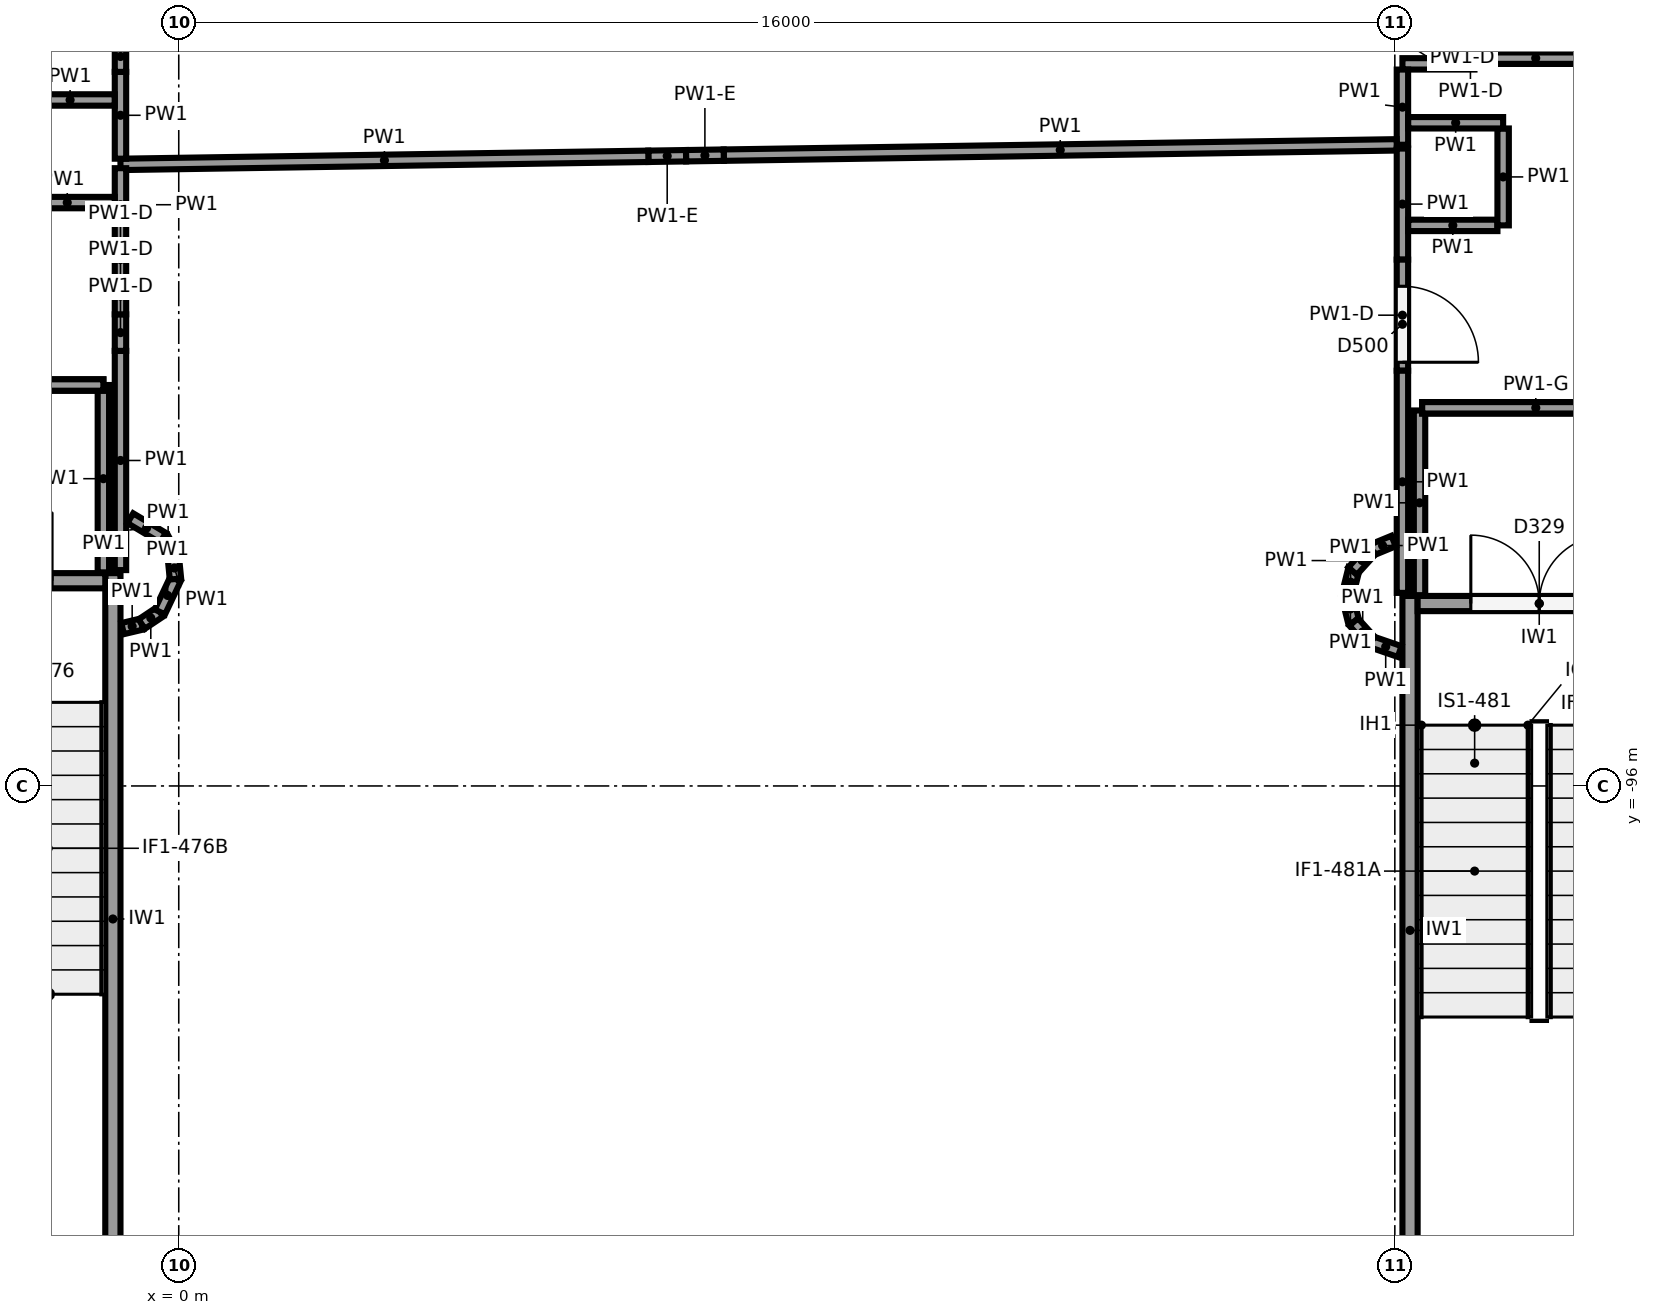
"""IFC4 building model, lengths in metres.
Left out: names, types, materials, properties, quantities, classifications, styles, units other than length and angle.
Written with IfcOpenShell. Run it as: python <this file> out.ifc"""

import sys

from ifc_helpers import new_model, si_unit, direction, frame, frame_2d, origin, origin_2d, place, context, subcontext, project, spatial, rectangle, circle, extrude, element, fill, save


model = new_model("IFC4")
c1 = context("Model", 3, precision=1e-05, world=origin(), true_north=direction((0.0, 1.0)))
c2 = subcontext(c1, "Body", "Model", "MODEL_VIEW")
j1 = project(units=[si_unit("LENGTHUNIT", "METRE"), si_unit("PLANEANGLEUNIT", "RADIAN")], contexts=[c1])
p1 = place(None, origin())
s1 = spatial("IfcSite", under=j1, at=p1, CompositionType="ELEMENT")
p2 = place(p1, origin())
s2 = spatial("IfcBuilding", under=s1, at=p2, CompositionType="ELEMENT")
p3 = place(p2, frame((0.0, 0.0, -4.0)))
s3 = spatial("IfcBuildingStorey", under=s2, at=p3, CompositionType="ELEMENT", Elevation=-4.0)
for number, where, z_axis, x_axis in (
    (1, (6.871, -89.518, -0.4), (0.0, 0.0, 1.0), (1.0, 0.0, 0.0)),
    (2, (7.667, -98.6, -0.4), (0.0, 0.0, 1.0), (1.0, 0.0, 0.0)),
):
    element("IfcColumn", number, at=place(p3, frame(where, z_axis=z_axis, x_axis=x_axis)), inside=s3, PredefinedType="COLUMN", context=c2, shape_type="SweptSolid", body=[
        extrude(circle(Radius=0.45, at=origin_2d()), origin(), (0.0, 0.0, 1.0), 4.4),
    ])
p4 = place(p3, frame((-0.867, -102.3, -1.2), z_axis=(0.0, 0.0, 1.0), x_axis=(0.0, 1.0, 0.0)))
e3 = element("IfcWall", 3, at=p4, inside=s3, PredefinedType="SHEAR", context=c2, shape_type="SweptSolid", body=[
    extrude(rectangle(XDim=9.1, YDim=0.2, at=frame_2d((4.55, 0.0))), origin(), (0.0, 0.0, 1.0), 4.8),
])
p5 = place(p3, frame((-4.167, -93.3, -1.2), z_axis=(0.0, 0.0, 1.0), x_axis=(1.0, 0.0, 0.0)))
e4 = element("IfcWall", 4, at=p5, inside=s3, PredefinedType="SHEAR", context=c2, shape_type="SweptSolid", body=[
    extrude(rectangle(XDim=3.2, YDim=0.2, at=frame_2d((1.6, 0.0))), origin(), (0.0, 0.0, 1.0), 4.8),
])
p6 = place(p5, frame((0.7, 0.0, 1.2)))
e5 = element("IfcOpeningElement", 5, at=p6, cuts=e4, PredefinedType="OPENING", context=c2, shape_type="SweptSolid", body=[
    extrude(rectangle(XDim=1.8, YDim=2.1, at=frame_2d((0.9, 1.05))), frame((0.0, 0.11, 0.0), z_axis=(0.0, -1.0, 0.0), x_axis=(1.0, 0.0, 0.0)), (0.0, 0.0, 1.0), 0.22),
])
p7 = place(p3, frame((16.2, -102.3, -1.2), z_axis=(0.0, 0.0, 1.0), x_axis=(0.0, 1.0, 0.0)))
e6 = element("IfcWall", 6, at=p7, inside=s3, PredefinedType="SHEAR", context=c2, shape_type="SweptSolid", body=[
    extrude(rectangle(XDim=8.8, YDim=0.2, at=frame_2d((4.4, 0.0))), origin(), (0.0, 0.0, 1.0), 4.8),
])
p8 = place(p3, frame((16.3, -93.6, -1.2), z_axis=(0.0, 0.0, 1.0), x_axis=(1.0, 0.0, 0.0)))
e7 = element("IfcWall", 7, at=p8, inside=s3, PredefinedType="SHEAR", context=c2, shape_type="SweptSolid", body=[
    extrude(rectangle(XDim=3.2, YDim=0.2, at=frame_2d((1.6, 0.0))), origin(), (0.0, 0.0, 1.0), 4.8),
])
p9 = place(p8, frame((0.7, 0.0, 1.2)))
e8 = element("IfcOpeningElement", 8, at=p9, cuts=e7, PredefinedType="OPENING", context=c2, shape_type="SweptSolid", body=[
    extrude(rectangle(XDim=1.8, YDim=2.1, at=frame_2d((0.9, 1.05))), frame((0.0, 0.11, 0.0), z_axis=(0.0, -1.0, 0.0), x_axis=(1.0, 0.0, 0.0)), (0.0, 0.0, 1.0), 0.22),
])
p10 = place(p3, frame((16.941, -86.052, 0.0), z_axis=(0.0, 0.0, 1.0), x_axis=(0.231907494809, -0.972737844361, 0.0)))
e9 = element("IfcWall", 9, at=p10, inside=s3, PredefinedType="PARTITIONING", context=c2, shape_type="SweptSolid", body=[
    extrude(rectangle(XDim=0.46, YDim=0.15, at=frame_2d((0.23, 0.0))), origin(), (0.0, 0.0, 1.0), 2.3),
])
p11 = place(p3, frame((17.048, -86.5, 0.0), z_axis=(0.0, 0.0, 1.0), x_axis=(-1.0, 0.0, 0.0)))
e10 = element("IfcWall", 10, at=p11, inside=s3, PredefinedType="PARTITIONING", context=c2, shape_type="SweptSolid", body=[
    extrude(rectangle(XDim=0.948, YDim=0.15, at=frame_2d((0.474, 0.0))), origin(), (0.0, 0.0, 1.0), 3.6),
])
p12 = place(p3, frame((16.1, -86.575, 0.0), z_axis=(0.0, 0.0, 1.0), x_axis=(0.0, -1.0, 0.0)))
e11 = element("IfcWall", 11, at=p12, inside=s3, PredefinedType="PARTITIONING", context=c2, shape_type="SweptSolid", body=[
    extrude(rectangle(XDim=0.989, YDim=0.15, at=frame_2d((0.495, 0.0))), origin(), (0.0, 0.0, 1.0), 3.6),
])
p13 = place(p3, frame((16.025, -87.565, 0.0), z_axis=(0.0, 0.0, 1.0), x_axis=(-0.999882927084, -0.015301376583, 0.0)))
e12 = element("IfcWall", 12, at=p13, inside=s3, PredefinedType="PARTITIONING", context=c2, shape_type="SweptSolid", body=[
    extrude(rectangle(XDim=8.855, YDim=0.15, at=frame_2d((4.428, 0.0))), origin(), (0.0, 0.0, 1.0), 3.6),
])
for number, where, z_axis, x_axis in (
    (13, (7.171, -87.701, 0.0), (0.0, 0.0, 1.0), (-1.0, -0.015, 0.0)),
    (14, (6.675, -87.708, 0.0), (0.0, 0.0, 1.0), (-1.0, -0.016, 0.0)),
):
    element("IfcWall", number, at=place(p3, frame(where, z_axis=z_axis, x_axis=x_axis)), inside=s3, PredefinedType="PARTITIONING", context=c2, shape_type="SweptSolid", body=[
        extrude(rectangle(XDim=0.496, YDim=0.15, at=frame_2d((0.248, 0.0))), origin(), (0.0, 0.0, 1.0), 2.85),
    ])
p14 = place(p3, frame((6.178, -87.716, 0.0), z_axis=(0.0, 0.0, 1.0), x_axis=(-0.999883104063, -0.01528980737, 0.0)))
e15 = element("IfcWall", 15, at=p14, inside=s3, PredefinedType="PARTITIONING", context=c2, shape_type="SweptSolid", body=[
    extrude(rectangle(XDim=6.946, YDim=0.15, at=frame_2d((3.473, 0.0))), origin(), (0.0, 0.0, 1.0), 3.6),
])
p15 = place(p3, frame((-0.767, -87.748, 0.0), z_axis=(0.0, 0.0, 1.0), x_axis=(0.0, 1.0, 0.0)))
e16 = element("IfcWall", 16, at=p15, inside=s3, PredefinedType="PARTITIONING", context=c2, shape_type="SweptSolid", body=[
    extrude(rectangle(XDim=1.142, YDim=0.15, at=frame_2d((0.571, 0.0))), origin(), (0.0, 0.0, 1.0), 3.6),
])
p16 = place(p3, frame((-0.767, -86.606, 0.0), z_axis=(0.0, 0.0, 1.0), x_axis=(0.0, 1.0, 0.0)))
e17 = element("IfcWall", 17, at=p16, inside=s3, PredefinedType="PARTITIONING", context=c2, shape_type="SweptSolid", body=[
    extrude(rectangle(XDim=0.406, YDim=0.15, at=frame_2d((0.203, 0.0))), origin(), (0.0, 0.0, 1.0), 2.3),
])
p17 = place(p3, frame((-0.767, -93.16, 0.0), z_axis=(0.0, 0.0, 1.0), x_axis=(0.0, 1.0, 0.0)))
e18 = element("IfcWall", 18, at=p17, inside=s3, PredefinedType="PARTITIONING", context=c2, shape_type="SweptSolid", body=[
    extrude(rectangle(XDim=2.884, YDim=0.15, at=frame_2d((1.442, 0.0))), origin(), (0.0, 0.0, 1.0), 3.6),
])
p18 = place(p3, frame((-0.767, -90.276, 0.0), z_axis=(0.0, 0.0, 1.0), x_axis=(0.0, 1.0, 0.0)))
e19 = element("IfcWall", 19, at=p18, inside=s3, PredefinedType="PARTITIONING", context=c2, shape_type="SweptSolid", body=[
    extrude(rectangle(XDim=0.48, YDim=0.15, at=frame_2d((0.24, 0.0))), origin(), (0.0, 0.0, 1.0), 2.3),
])
for number, where, z_axis, x_axis in (
    (20, (-0.767, -89.795, 0.0), (0.0, 0.0, 1.0), (0.0, 1.0, 0.0)),
    (21, (-0.767, -89.315, 0.0), (0.0, 0.0, 1.0), (0.0, 1.0, 0.0)),
):
    element("IfcWall", number, at=place(p3, frame(where, z_axis=z_axis, x_axis=x_axis)), inside=s3, PredefinedType="PARTITIONING", context=c2, shape_type="SweptSolid", body=[
        extrude(rectangle(XDim=0.481, YDim=0.15, at=frame_2d((0.24, 0.0))), origin(), (0.0, 0.0, 1.0), 2.3),
    ])
p19 = place(p3, frame((-0.767, -88.834, 0.0), z_axis=(0.0, 0.0, 1.0), x_axis=(0.0, 1.0, 0.0)))
e22 = element("IfcWall", 22, at=p19, inside=s3, PredefinedType="PARTITIONING", context=c2, shape_type="SweptSolid", body=[
    extrude(rectangle(XDim=0.961, YDim=0.15, at=frame_2d((0.481, 0.0))), origin(), (0.0, 0.0, 1.0), 3.6),
])
p20 = place(p3, frame((16.1, -87.614, 0.0), z_axis=(0.0, 0.0, 1.0), x_axis=(0.0, -1.0, 0.0)))
e23 = element("IfcWall", 23, at=p20, inside=s3, PredefinedType="PARTITIONING", context=c2, shape_type="SweptSolid", body=[
    extrude(rectangle(XDim=1.461, YDim=0.15, at=frame_2d((0.731, 0.0))), origin(), (0.0, 0.0, 1.0), 3.6),
])
p21 = place(p3, frame((16.1, -89.076, 0.0), z_axis=(0.0, 0.0, 1.0), x_axis=(0.0, -1.0, 0.0)))
e24 = element("IfcWall", 24, at=p21, inside=s3, PredefinedType="PARTITIONING", context=c2, shape_type="SweptSolid", body=[
    extrude(rectangle(XDim=1.461, YDim=0.15, at=frame_2d((0.731, 0.0))), origin(), (0.0, 0.0, 1.0), 2.3),
])
p22 = place(p21, frame((0.35, 0.0, 0.0)))
e25 = element("IfcOpeningElement", 25, at=p22, cuts=e24, PredefinedType="OPENING", context=c2, shape_type="SweptSolid", body=[
    extrude(rectangle(XDim=1.0, YDim=2.1, at=frame_2d((0.5, 1.05))), frame((0.0, 0.085, 0.0), z_axis=(0.0, -1.0, 0.0), x_axis=(1.0, 0.0, 0.0)), (0.0, 0.0, 1.0), 0.17),
])
p23 = place(p3, frame((16.1, -90.537, 0.0), z_axis=(0.0, 0.0, 1.0), x_axis=(0.0, -1.0, 0.0)))
e26 = element("IfcWall", 26, at=p23, inside=s3, PredefinedType="PARTITIONING", context=c2, shape_type="SweptSolid", body=[
    extrude(rectangle(XDim=2.923, YDim=0.15, at=frame_2d((1.461, 0.0))), origin(), (0.0, 0.0, 1.0), 3.6),
])
p24 = place(p3, frame((-2.092, -88.325, 0.0), z_axis=(0.0, 0.0, 1.0), x_axis=(1.0, 0.0, 0.0)))
e27 = element("IfcWall", 27, at=p24, inside=s3, PredefinedType="PARTITIONING", context=c2, shape_type="SweptSolid", body=[
    extrude(rectangle(XDim=1.249, YDim=0.15, at=frame_2d((0.625, 0.0))), origin(), (0.0, 0.0, 1.0), 3.6),
])
p25 = place(p3, frame((-0.843, -86.975, 0.0), z_axis=(0.0, 0.0, 1.0), x_axis=(-1.0, 0.0, 0.0)))
e28 = element("IfcWall", 28, at=p25, inside=s3, PredefinedType="PARTITIONING", context=c2, shape_type="SweptSolid", body=[
    extrude(rectangle(XDim=1.174, YDim=0.15, at=frame_2d((0.587, 0.0))), origin(), (0.0, 0.0, 1.0), 3.6),
])
p26 = place(p3, frame((-0.992, -93.19, 0.0), z_axis=(0.0, 0.0, 1.0), x_axis=(0.0, 1.0, 0.0)))
e29 = element("IfcWall", 29, at=p26, inside=s3, PredefinedType="PARTITIONING", context=c2, shape_type="SweptSolid", body=[
    extrude(rectangle(XDim=2.465, YDim=0.15, at=frame_2d((1.232, 0.0))), origin(), (0.0, 0.0, 1.0), 3.6),
])
p27 = place(p3, frame((-0.992, -90.725, 0.0), z_axis=(0.0, 0.0, 1.0), x_axis=(-1.0, 0.0, 0.0)))
e30 = element("IfcWall", 30, at=p27, inside=s3, PredefinedType="PARTITIONING", context=c2, shape_type="SweptSolid", body=[
    extrude(rectangle(XDim=7.015, YDim=0.15, at=frame_2d((3.507, 0.0))), origin(), (0.0, 0.0, 1.0), 2.85),
])
p28 = place(p3, frame((-0.992, -90.725, 2.85), z_axis=(0.0, 0.0, 1.0), x_axis=(-1.0, 0.0, 0.0)))
e31 = element("IfcWall", 31, at=p28, inside=s3, PredefinedType="PARTITIONING", context=c2, shape_type="SweptSolid", body=[
    extrude(rectangle(XDim=5.144, YDim=0.15, at=frame_2d((2.572, 0.0))), origin(), (0.0, 0.0, 1.0), 0.75),
])
p29 = place(p3, frame((-0.738, -93.93, 0.0), z_axis=(0.0, 0.0, 1.0), x_axis=(0.973130593004, 0.230253879357, 0.0)))
e32 = element("IfcWall", 32, at=p29, inside=s3, PredefinedType="PARTITIONING", context=c2, shape_type="SweptSolid", body=[
    extrude(rectangle(XDim=0.258, YDim=0.15, at=frame_2d((0.129, 0.0))), origin(), (0.0, 0.0, 1.0), 3.6),
])
p30 = place(p3, frame((-0.488, -93.87, 0.0), z_axis=(0.0, 0.0, 1.0), x_axis=(0.831397130511, 0.555678694372, 0.0)))
e33 = element("IfcWall", 33, at=p30, inside=s3, PredefinedType="PARTITIONING", context=c2, shape_type="SweptSolid", body=[
    extrude(rectangle(XDim=0.288, YDim=0.15, at=frame_2d((0.144, 0.0))), origin(), (0.0, 0.0, 1.0), 3.6),
])
p31 = place(p3, frame((-0.248, -93.71, 0.0), z_axis=(0.0, 0.0, 1.0), x_axis=(0.427757963167, 0.903893315025, 0.0)))
e34 = element("IfcWall", 34, at=p31, inside=s3, PredefinedType="PARTITIONING", context=c2, shape_type="SweptSolid", body=[
    extrude(rectangle(XDim=0.479, YDim=0.15, at=frame_2d((0.24, 0.0))), origin(), (0.0, 0.0, 1.0), 3.6),
])
p32 = place(p3, frame((-0.043, -93.277, 0.0), z_axis=(0.0, 0.0, 1.0), x_axis=(-0.0978334953, 0.99520279702, 0.0)))
e35 = element("IfcWall", 35, at=p32, inside=s3, PredefinedType="PARTITIONING", context=c2, shape_type="SweptSolid", body=[
    extrude(rectangle(XDim=0.29, YDim=0.15, at=frame_2d((0.145, 0.0))), origin(), (0.0, 0.0, 1.0), 3.6),
])
p33 = place(p3, frame((-0.072, -92.989, 0.0), z_axis=(0.0, 0.0, 1.0), x_axis=(-0.471682765858, 0.881768319, 0.0)))
e36 = element("IfcWall", 36, at=p33, inside=s3, PredefinedType="PARTITIONING", context=c2, shape_type="SweptSolid", body=[
    extrude(rectangle(XDim=0.289, YDim=0.15, at=frame_2d((0.145, 0.0))), origin(), (0.0, 0.0, 1.0), 3.6),
])
p34 = place(p3, frame((-0.208, -92.734, 0.0), z_axis=(0.0, 0.0, 1.0), x_axis=(-0.85856712863, 0.512701166017, 0.0)))
e37 = element("IfcWall", 37, at=p34, inside=s3, PredefinedType="PARTITIONING", context=c2, shape_type="SweptSolid", body=[
    extrude(rectangle(XDim=0.5, YDim=0.15, at=frame_2d((0.25, 0.0))), origin(), (0.0, 0.0, 1.0), 3.6),
])
p35 = place(p3, frame((16.176, -88.625, 0.0), z_axis=(0.0, 0.0, 1.0), x_axis=(1.0, 0.0, 0.0)))
e38 = element("IfcWall", 38, at=p35, inside=s3, PredefinedType="PARTITIONING", context=c2, shape_type="SweptSolid", body=[
    extrude(rectangle(XDim=1.174, YDim=0.15, at=frame_2d((0.587, 0.0))), origin(), (0.0, 0.0, 1.0), 3.6),
])
p36 = place(p3, frame((17.425, -88.625, 0.0), z_axis=(0.0, 0.0, 1.0), x_axis=(0.0, 1.0, 0.0)))
e39 = element("IfcWall", 39, at=p36, inside=s3, PredefinedType="PARTITIONING", context=c2, shape_type="SweptSolid", body=[
    extrude(rectangle(XDim=1.275, YDim=0.15, at=frame_2d((0.637, 0.0))), origin(), (0.0, 0.0, 1.0), 3.6),
])
p37 = place(p3, frame((17.425, -87.275, 0.0), z_axis=(0.0, 0.0, 1.0), x_axis=(-1.0, 0.0, 0.0)))
e40 = element("IfcWall", 40, at=p37, inside=s3, PredefinedType="PARTITIONING", context=c2, shape_type="SweptSolid", body=[
    extrude(rectangle(XDim=1.249, YDim=0.15, at=frame_2d((0.625, 0.0))), origin(), (0.0, 0.0, 1.0), 3.6),
])
p38 = place(p3, frame((16.325, -91.06, 0.0), z_axis=(0.0, 0.0, 1.0), x_axis=(0.0, -1.0, 0.0)))
e41 = element("IfcWall", 41, at=p38, inside=s3, PredefinedType="PARTITIONING", context=c2, shape_type="SweptSolid", body=[
    extrude(rectangle(XDim=2.43, YDim=0.15, at=frame_2d((1.215, 0.0))), origin(), (0.0, 0.0, 1.0), 3.6),
])
p39 = place(p3, frame((21.84, -91.025, 0.0), z_axis=(0.0, 0.0, 1.0), x_axis=(-1.0, 0.0, 0.0)))
e42 = element("IfcWall", 42, at=p39, inside=s3, PredefinedType="PARTITIONING", context=c2, shape_type="SweptSolid", body=[
    extrude(rectangle(XDim=5.48, YDim=0.15, at=frame_2d((2.74, 0.0))), origin(), (0.0, 0.0, 1.0), 2.85),
])
p40 = place(p3, frame((19.349, -91.025, 2.85), z_axis=(0.0, 0.0, 1.0), x_axis=(-1.0, 0.0, 0.0)))
e43 = element("IfcWall", 43, at=p40, inside=s3, PredefinedType="PARTITIONING", context=c2, shape_type="SweptSolid", body=[
    extrude(rectangle(XDim=2.989, YDim=0.15, at=frame_2d((1.495, 0.0))), origin(), (0.0, 0.0, 1.0), 0.75),
])
p41 = place(p3, frame((15.464, -93.137, 0.0), z_axis=(0.0, 0.0, 1.0), x_axis=(-0.242535625036, -0.970142500145, 0.0)))
e44 = element("IfcWall", 44, at=p41, inside=s3, PredefinedType="PARTITIONING", context=c2, shape_type="SweptSolid", body=[
    extrude(rectangle(XDim=0.375, YDim=0.15, at=frame_2d((0.187, 0.0))), origin(), (0.0, 0.0, 1.0), 3.6),
])
p42 = place(p3, frame((15.373, -93.5, 0.0), z_axis=(0.0, 0.0, 1.0), x_axis=(0.242535625036, -0.970142500145, 0.0)))
e45 = element("IfcWall", 45, at=p42, inside=s3, PredefinedType="PARTITIONING", context=c2, shape_type="SweptSolid", body=[
    extrude(rectangle(XDim=0.353, YDim=0.15, at=frame_2d((0.177, 0.0))), origin(), (0.0, 0.0, 1.0), 3.6),
])
p43 = place(p3, frame((15.458, -93.843, 0.0), z_axis=(0.0, 0.0, 1.0), x_axis=(0.671779735796, -0.740750961237, 0.0)))
e46 = element("IfcWall", 46, at=p43, inside=s3, PredefinedType="PARTITIONING", context=c2, shape_type="SweptSolid", body=[
    extrude(rectangle(XDim=0.354, YDim=0.15, at=frame_2d((0.177, 0.0))), origin(), (0.0, 0.0, 1.0), 3.6),
])
p44 = place(p3, frame((15.696, -94.105, 0.0), z_axis=(0.0, 0.0, 1.0), x_axis=(0.945493169619, -0.32564192943, 0.0)))
e47 = element("IfcWall", 47, at=p44, inside=s3, PredefinedType="PARTITIONING", context=c2, shape_type="SweptSolid", body=[
    extrude(rectangle(XDim=0.388, YDim=0.15, at=frame_2d((0.194, 0.0))), origin(), (0.0, 0.0, 1.0), 3.6),
])
p45 = place(p3, frame((21.457, -86.425, 0.0), z_axis=(0.0, 0.0, 1.0), x_axis=(-1.0, 0.0, 0.0)))
e48 = element("IfcWall", 48, at=p45, inside=s3, PredefinedType="PARTITIONING", context=c2, shape_type="SweptSolid", body=[
    extrude(rectangle(XDim=4.33, YDim=0.15, at=frame_2d((2.165, 0.0))), origin(), (0.0, 0.0, 1.0), 2.85),
])
p46 = place(p3, frame((18.579, -86.425, 2.85), z_axis=(0.0, 0.0, 1.0), x_axis=(-1.0, 0.0, 0.0)))
e49 = element("IfcWall", 49, at=p46, inside=s3, PredefinedType="PARTITIONING", context=c2, shape_type="SweptSolid", body=[
    extrude(rectangle(XDim=1.452, YDim=0.15, at=frame_2d((0.726, 0.0))), origin(), (0.0, 0.0, 1.0), 0.75),
])
p47 = place(p3, frame((15.983, -92.778, 0.0), z_axis=(0.0, 0.0, 1.0), x_axis=(-0.924710471816, -0.380671174788, 0.0)))
e50 = element("IfcWall", 50, at=p47, inside=s3, PredefinedType="PARTITIONING", context=c2, shape_type="SweptSolid", body=[
    extrude(rectangle(XDim=0.312, YDim=0.15, at=frame_2d((0.156, 0.0))), origin(), (0.0, 0.0, 1.0), 3.6),
])
p48 = place(p3, frame((15.695, -92.896, 0.0), z_axis=(0.0, 0.0, 1.0), x_axis=(-0.671204763042, -0.741271991964, 0.0)))
e51 = element("IfcWall", 51, at=p48, inside=s3, PredefinedType="PARTITIONING", context=c2, shape_type="SweptSolid", body=[
    extrude(rectangle(XDim=0.373, YDim=0.15, at=frame_2d((0.187, 0.0))), origin(), (0.0, 0.0, 1.0), 3.6),
])
p49 = place(p9, origin())
e52 = element("IfcDoor", 52, at=p49, inside=s3, OperationType="DOUBLE_DOOR_SINGLE_SWING", PredefinedType="DOOR", context=c2, shape_type="SweptSolid", body=[
    extrude(rectangle(XDim=1.8, YDim=2.1, at=frame_2d((0.9, 1.05))), frame((0.0, 0.025, 0.0), z_axis=(0.0, -1.0, 0.0), x_axis=(1.0, 0.0, 0.0)), (0.0, 0.0, 1.0), 0.05),
])
fill(e8, e52)
p50 = place(p22, origin())
e53 = element("IfcDoor", 53, at=p50, inside=s3, OperationType="SINGLE_SWING_RIGHT", PredefinedType="DOOR", context=c2, shape_type="SweptSolid", body=[
    extrude(rectangle(XDim=1.0, YDim=2.1, at=frame_2d((0.5, 1.05))), frame((0.0, 0.025, 0.0), z_axis=(0.0, -1.0, 0.0), x_axis=(1.0, 0.0, 0.0)), (0.0, 0.0, 1.0), 0.05),
])
fill(e25, e53)
save(model, sys.argv[1])
